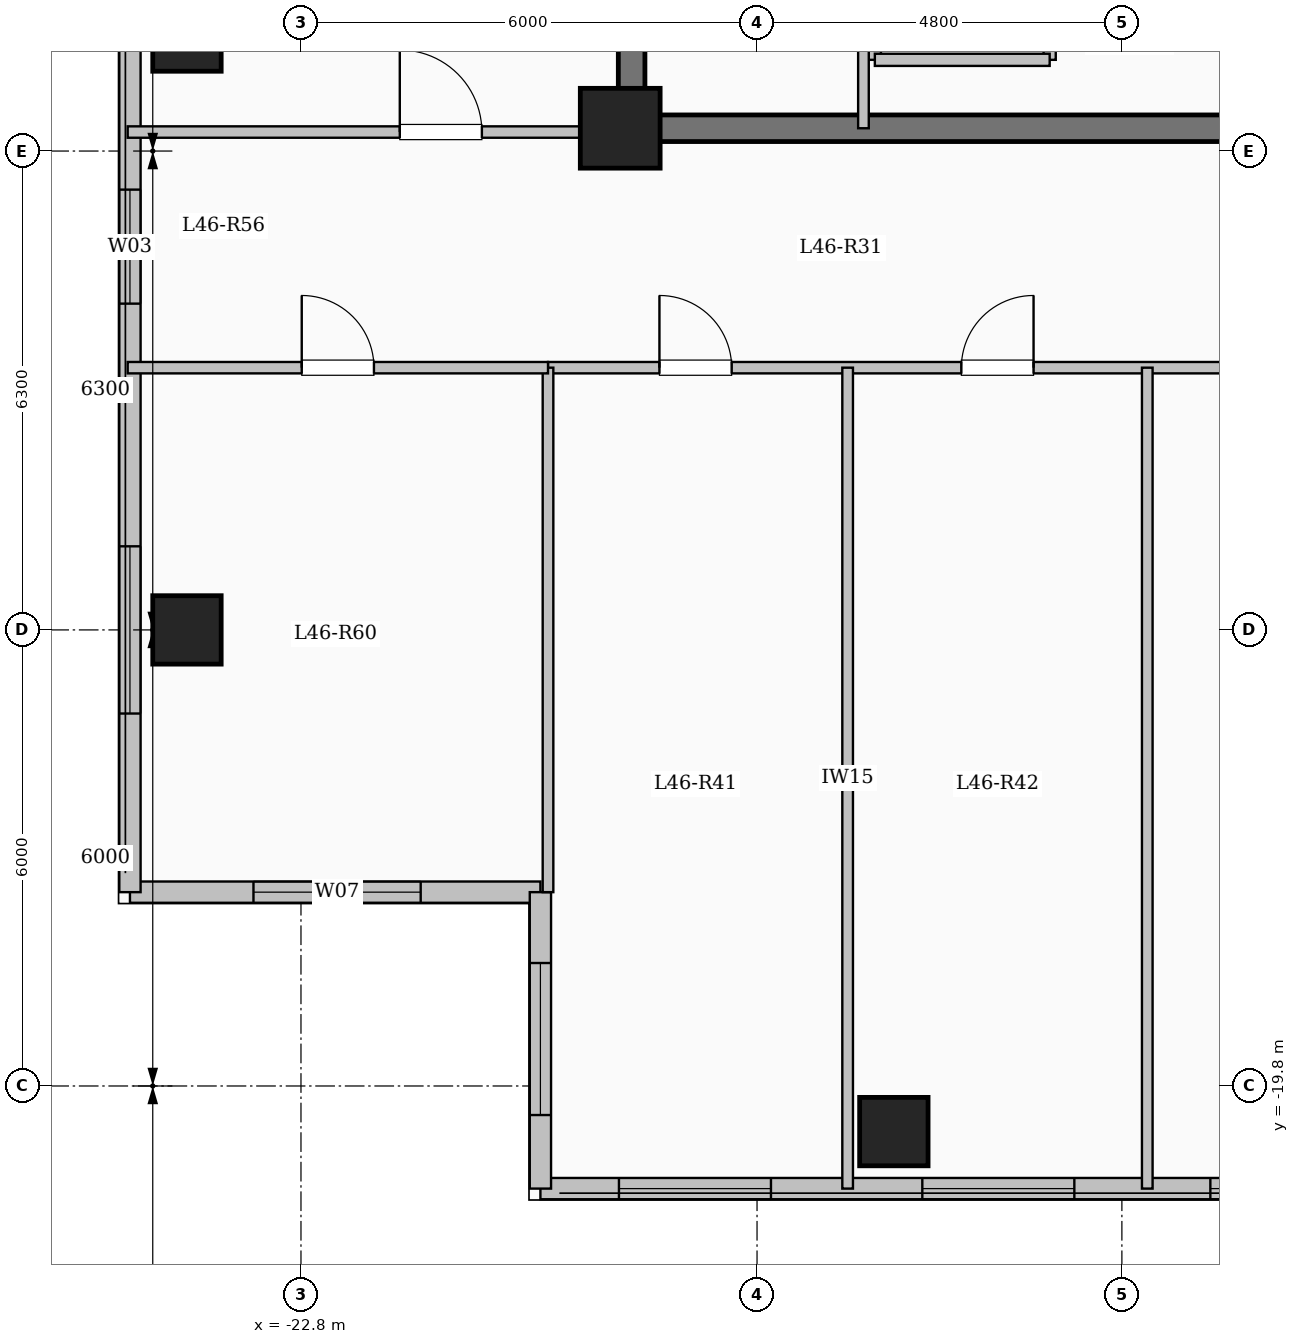
"""IFC4 building model, lengths in metres.
Left out: names, types, materials, properties, quantities, classifications, styles, units other than length and angle.
Written with IfcOpenShell. Run it as: python <this file> out.ifc"""

import sys

from ifc_helpers import new_model, si_unit, direction, frame, frame_2d, origin, origin_2d, place, context, subcontext, project, spatial, rectangle, extrude, element, fill, save


model = new_model("IFC4")
c1 = context("Model", 3, precision=1e-05, world=origin(), true_north=direction((0.0, 1.0)))
c2 = subcontext(c1, "Body", "Model", "MODEL_VIEW")
j1 = project(units=[si_unit("LENGTHUNIT", "METRE"), si_unit("PLANEANGLEUNIT", "RADIAN")], contexts=[c1])
p1 = place(None, origin())
s1 = spatial("IfcSite", under=j1, at=p1, CompositionType="ELEMENT")
p2 = place(p1, origin())
s2 = spatial("IfcBuilding", under=s1, at=p2, CompositionType="ELEMENT")
p3 = place(p2, frame((0.0, 0.0, 169.45)))
s3 = spatial("IfcBuildingStorey", under=s2, at=p3, CompositionType="ELEMENT", Elevation=169.45)
p4 = place(p3, frame((-18.6, -7.2, 0.0), z_axis=(0.0, 0.0, 1.0), x_axis=(1.0, 0.0, 0.0)))
e1 = element("IfcColumn", 1, at=p4, inside=s3, PredefinedType="COLUMN", context=c2, shape_type="SweptSolid", body=[
    extrude(rectangle(XDim=1.05, YDim=1.05, at=origin_2d()), origin(), (0.0, 0.0, 1.0), 3.35),
])
for number, where, z_axis, x_axis in (
    (2, (-15.0, -20.4, 0.0), (0.0, 0.0, 1.0), (1.0, 0.0, 0.0)),
    (3, (-24.3, -13.8, 0.0), (0.0, 0.0, 1.0), (1.0, 0.0, 0.0)),
    (4, (-24.3, -6.0, 0.0), (0.0, 0.0, 1.0), (1.0, 0.0, 0.0)),
):
    element("IfcColumn", number, at=place(p3, frame(where, z_axis=z_axis, x_axis=x_axis)), inside=s3, PredefinedType="COLUMN", context=c2, shape_type="SweptSolid", body=[
        extrude(rectangle(XDim=0.9, YDim=0.9, at=origin_2d()), origin(), (0.0, 0.0, 1.0), 3.35),
    ])
p5 = place(p3, frame((-19.65, -17.25, 0.0), z_axis=(0.0, 0.0, 1.0), x_axis=(-1.0, 0.0, 0.0)))
e5 = element("IfcWall", 5, at=p5, inside=s3, PredefinedType="SOLIDWALL", context=c2, shape_type="SweptSolid", body=[
    extrude(rectangle(XDim=5.4, YDim=0.28, at=frame_2d((2.7, 0.0))), origin(), (0.0, 0.0, 1.0), 3.05),
])
p6 = place(p5, frame((1.575, 0.0, 0.9)))
e6 = element("IfcOpeningElement", 6, at=p6, cuts=e5, PredefinedType="OPENING", context=c2, shape_type="SweptSolid", body=[
    extrude(rectangle(XDim=2.2, YDim=1.75, at=frame_2d((1.1, 0.875))), frame((0.0, 0.15, 0.0), z_axis=(0.0, -1.0, 0.0), x_axis=(1.0, 0.0, 0.0)), (0.0, 0.0, 1.0), 0.3),
])
p7 = place(p3, frame((-25.05, -17.25, 0.0), z_axis=(0.0, 0.0, 1.0), x_axis=(0.0, 1.0, 0.0)))
e7 = element("IfcWall", 7, at=p7, inside=s3, PredefinedType="SOLIDWALL", context=c2, shape_type="SweptSolid", body=[
    extrude(rectangle(XDim=34.5, YDim=0.28, at=frame_2d((17.25, 0.0))), origin(), (0.0, 0.0, 1.0), 3.05),
])
p8 = place(p7, frame((2.35, 0.0, 0.9)))
e8 = element("IfcOpeningElement", 8, at=p8, cuts=e7, PredefinedType="OPENING", context=c2, shape_type="SweptSolid", body=[
    extrude(rectangle(XDim=2.2, YDim=1.75, at=frame_2d((1.1, 0.875))), frame((0.0, 0.15, 0.0), z_axis=(0.0, -1.0, 0.0), x_axis=(1.0, 0.0, 0.0)), (0.0, 0.0, 1.0), 0.3),
])
p9 = place(p7, frame((7.742, 0.0, 0.9)))
e9 = element("IfcOpeningElement", 9, at=p9, cuts=e7, PredefinedType="OPENING", context=c2, shape_type="SweptSolid", body=[
    extrude(rectangle(XDim=1.5, YDim=1.65, at=frame_2d((0.75, 0.825))), frame((0.0, 0.15, 0.0), z_axis=(0.0, -1.0, 0.0), x_axis=(1.0, 0.0, 0.0)), (0.0, 0.0, 1.0), 0.3),
])
p10 = place(p7, frame((18.0, 0.0, 0.9)))
e10 = element("IfcOpeningElement", 10, at=p10, cuts=e7, PredefinedType="OPENING", context=c2, shape_type="SweptSolid", body=[
    extrude(rectangle(XDim=2.0, YDim=1.7, at=frame_2d((1.0, 0.85))), frame((0.0, 0.15, 0.0), z_axis=(0.0, -1.0, 0.0), x_axis=(1.0, 0.0, 0.0)), (0.0, 0.0, 1.0), 0.3),
])
p11 = place(p7, frame((28.375, 0.0, 0.95)))
e11 = element("IfcOpeningElement", 11, at=p11, cuts=e7, PredefinedType="OPENING", context=c2, shape_type="SweptSolid", body=[
    extrude(rectangle(XDim=1.0, YDim=1.5, at=frame_2d((0.5, 0.75))), frame((0.0, 0.15, 0.0), z_axis=(0.0, -1.0, 0.0), x_axis=(1.0, 0.0, 0.0)), (0.0, 0.0, 1.0), 0.3),
])
p12 = place(p7, frame((31.125, 0.0, 0.9)))
e12 = element("IfcOpeningElement", 12, at=p12, cuts=e7, PredefinedType="OPENING", context=c2, shape_type="SweptSolid", body=[
    extrude(rectangle(XDim=2.0, YDim=1.7, at=frame_2d((1.0, 0.85))), frame((0.0, 0.15, 0.0), z_axis=(0.0, -1.0, 0.0), x_axis=(1.0, 0.0, 0.0)), (0.0, 0.0, 1.0), 0.3),
])
p13 = place(p3, frame((-7.35, -21.15, 0.0), z_axis=(0.0, 0.0, 1.0), x_axis=(-1.0, 0.0, 0.0)))
e13 = element("IfcWall", 13, at=p13, inside=s3, PredefinedType="SOLIDWALL", context=c2, shape_type="SweptSolid", body=[
    extrude(rectangle(XDim=12.3, YDim=0.28, at=frame_2d((6.15, 0.0))), origin(), (0.0, 0.0, 1.0), 3.05),
])
p14 = place(p13, frame((0.147, 0.0, 0.95)))
e14 = element("IfcOpeningElement", 14, at=p14, cuts=e13, PredefinedType="OPENING", context=c2, shape_type="SweptSolid", body=[
    extrude(rectangle(XDim=0.85, YDim=1.5, at=frame_2d((0.425, 0.75))), frame((0.0, 0.15, 0.0), z_axis=(0.0, -1.0, 0.0), x_axis=(1.0, 0.0, 0.0)), (0.0, 0.0, 1.0), 0.3),
])
p15 = place(p13, frame((1.986, 0.0, 0.9)))
e15 = element("IfcOpeningElement", 15, at=p15, cuts=e13, PredefinedType="OPENING", context=c2, shape_type="SweptSolid", body=[
    extrude(rectangle(XDim=1.5, YDim=1.65, at=frame_2d((0.75, 0.825))), frame((0.0, 0.15, 0.0), z_axis=(0.0, -1.0, 0.0), x_axis=(1.0, 0.0, 0.0)), (0.0, 0.0, 1.0), 0.3),
])
p16 = place(p13, frame((5.275, 0.0, 0.9)))
e16 = element("IfcOpeningElement", 16, at=p16, cuts=e13, PredefinedType="OPENING", context=c2, shape_type="SweptSolid", body=[
    extrude(rectangle(XDim=2.0, YDim=1.7, at=frame_2d((1.0, 0.85))), frame((0.0, 0.15, 0.0), z_axis=(0.0, -1.0, 0.0), x_axis=(1.0, 0.0, 0.0)), (0.0, 0.0, 1.0), 0.3),
])
p17 = place(p13, frame((9.267, 0.0, 0.9)))
e17 = element("IfcOpeningElement", 17, at=p17, cuts=e13, PredefinedType="OPENING", context=c2, shape_type="SweptSolid", body=[
    extrude(rectangle(XDim=2.0, YDim=1.7, at=frame_2d((1.0, 0.85))), frame((0.0, 0.15, 0.0), z_axis=(0.0, -1.0, 0.0), x_axis=(1.0, 0.0, 0.0)), (0.0, 0.0, 1.0), 0.3),
])
p18 = place(p3, frame((-19.65, -21.15, 0.0), z_axis=(0.0, 0.0, 1.0), x_axis=(0.0, 1.0, 0.0)))
e18 = element("IfcWall", 18, at=p18, inside=s3, PredefinedType="SOLIDWALL", context=c2, shape_type="SweptSolid", body=[
    extrude(rectangle(XDim=3.9, YDim=0.28, at=frame_2d((1.95, 0.0))), origin(), (0.0, 0.0, 1.0), 3.05),
])
p19 = place(p18, frame((0.968, 0.0, 0.9)))
e19 = element("IfcOpeningElement", 19, at=p19, cuts=e18, PredefinedType="OPENING", context=c2, shape_type="SweptSolid", body=[
    extrude(rectangle(XDim=2.0, YDim=1.7, at=frame_2d((1.0, 0.85))), frame((0.0, 0.15, 0.0), z_axis=(0.0, -1.0, 0.0), x_axis=(1.0, 0.0, 0.0)), (0.0, 0.0, 1.0), 0.3),
])
for number, where, z_axis, x_axis in (
    (20, (-15.25, -6.3, 0.0), (0.0, 0.0, 1.0), (0.0, 1.0, 0.0)),
    (21, (-12.95, -6.3, 0.0), (0.0, 0.0, 1.0), (0.0, 1.0, 0.0)),
):
    element("IfcWall", number, at=place(p3, frame(where, z_axis=z_axis, x_axis=x_axis)), inside=s3, PredefinedType="SOLIDWALL", context=c2, shape_type="SweptSolid", body=[
        extrude(rectangle(XDim=2.6, YDim=0.16, at=frame_2d((1.3, 0.0))), origin(), (0.0, 0.0, 1.0), 3.05),
    ])
p20 = place(p3, frame((-15.25, -6.3, 0.0), z_axis=(0.0, 0.0, 1.0), x_axis=(1.0, 0.0, 0.0)))
e22 = element("IfcWall", 22, at=p20, inside=s3, PredefinedType="SOLIDWALL", context=c2, shape_type="SweptSolid", body=[
    extrude(rectangle(XDim=2.3, YDim=0.16, at=frame_2d((1.15, 0.0))), origin(), (0.0, 0.0, 1.0), 3.05),
])
p21 = place(p3, frame((-18.45, -7.375, 0.0), z_axis=(0.0, 0.0, 1.0), x_axis=(0.0, 1.0, 0.0)))
e23 = element("IfcWall", 23, at=p21, inside=s3, PredefinedType="SHEAR", context=c2, shape_type="SweptSolid", body=[
    extrude(rectangle(XDim=14.05, YDim=0.35, at=frame_2d((7.025, 0.0))), origin(), (0.0, 0.0, 1.0), 3.35),
])
p22 = place(p3, frame((-18.625, -7.2, 0.0), z_axis=(0.0, 0.0, 1.0), x_axis=(1.0, 0.0, 0.0)))
e24 = element("IfcWall", 24, at=p22, inside=s3, PredefinedType="SHEAR", context=c2, shape_type="SweptSolid", body=[
    extrude(rectangle(XDim=8.55, YDim=0.35, at=frame_2d((4.275, 0.0))), origin(), (0.0, 0.0, 1.0), 3.35),
])
p23 = place(p3, frame((-15.4, -7.2, 0.0), z_axis=(0.0, 0.0, 1.0), x_axis=(0.0, 1.0, 0.0)))
e25 = element("IfcWall", 25, at=p23, inside=s3, PredefinedType="PARTITIONING", context=c2, shape_type="SweptSolid", body=[
    extrude(rectangle(XDim=10.45, YDim=0.14, at=frame_2d((5.225, 0.0))), origin(), (0.0, 0.0, 1.0), 3.05),
])
p24 = place(p23, frame((9.25, 0.0, 0.0)))
e26 = element("IfcOpeningElement", 26, at=p24, cuts=e25, PredefinedType="OPENING", context=c2, shape_type="SweptSolid", body=[
    extrude(rectangle(XDim=0.9, YDim=2.08, at=frame_2d((0.45, 1.04))), frame((0.0, 0.08, 0.0), z_axis=(0.0, -1.0, 0.0), x_axis=(1.0, 0.0, 0.0)), (0.0, 0.0, 1.0), 0.16),
])
p25 = place(p3, frame((-19.55, -10.35, 0.0), z_axis=(0.0, 0.0, 1.0), x_axis=(1.0, 0.0, 0.0)))
e27 = element("IfcWall", 27, at=p25, inside=s3, PredefinedType="PARTITIONING", context=c2, shape_type="SweptSolid", body=[
    extrude(rectangle(XDim=11.0, YDim=0.15, at=frame_2d((5.5, 0.0))), origin(), (0.0, 0.0, 1.0), 3.05),
])
p26 = place(p25, frame((1.466, 0.0, 0.0)))
e28 = element("IfcOpeningElement", 28, at=p26, cuts=e27, PredefinedType="OPENING", context=c2, shape_type="SweptSolid", body=[
    extrude(rectangle(XDim=0.95, YDim=2.15, at=frame_2d((0.475, 1.075))), frame((0.0, 0.085, 0.0), z_axis=(0.0, -1.0, 0.0), x_axis=(1.0, 0.0, 0.0)), (0.0, 0.0, 1.0), 0.17),
])
p27 = place(p25, frame((5.438, 0.0, 0.0)))
e29 = element("IfcOpeningElement", 29, at=p27, cuts=e27, PredefinedType="OPENING", context=c2, shape_type="SweptSolid", body=[
    extrude(rectangle(XDim=0.95, YDim=2.15, at=frame_2d((0.475, 1.075))), frame((0.0, 0.085, 0.0), z_axis=(0.0, -1.0, 0.0), x_axis=(1.0, 0.0, 0.0)), (0.0, 0.0, 1.0), 0.17),
])
p28 = place(p25, frame((8.972, 0.0, 0.0)))
e30 = element("IfcOpeningElement", 30, at=p28, cuts=e27, PredefinedType="OPENING", context=c2, shape_type="SweptSolid", body=[
    extrude(rectangle(XDim=0.95, YDim=2.15, at=frame_2d((0.475, 1.075))), frame((0.0, 0.085, 0.0), z_axis=(0.0, -1.0, 0.0), x_axis=(1.0, 0.0, 0.0)), (0.0, 0.0, 1.0), 0.17),
])
for number, where, z_axis, x_axis in (
    (31, (-15.608, -21.15, 0.0), (0.0, 0.0, 1.0), (0.0, 1.0, 0.0)),
    (32, (-11.666, -21.15, 0.0), (0.0, 0.0, 1.0), (0.0, 1.0, 0.0)),
):
    element("IfcWall", number, at=place(p3, frame(where, z_axis=z_axis, x_axis=x_axis)), inside=s3, PredefinedType="PARTITIONING", context=c2, shape_type="SweptSolid", body=[
        extrude(rectangle(XDim=10.8, YDim=0.14, at=frame_2d((5.4, 0.0))), origin(), (0.0, 0.0, 1.0), 3.05),
    ])
p29 = place(p3, frame((-25.08, -7.25, 0.0), z_axis=(0.0, 0.0, 1.0), x_axis=(1.0, 0.0, 0.0)))
e33 = element("IfcWall", 33, at=p29, inside=s3, PredefinedType="PARTITIONING", context=c2, shape_type="SweptSolid", body=[
    extrude(rectangle(XDim=6.63, YDim=0.15, at=frame_2d((3.315, 0.0))), origin(), (0.0, 0.0, 1.0), 3.05),
])
p30 = place(p29, frame((3.58, 0.0, 0.0)))
e34 = element("IfcOpeningElement", 34, at=p30, cuts=e33, PredefinedType="OPENING", context=c2, shape_type="SweptSolid", body=[
    extrude(rectangle(XDim=1.08, YDim=2.15, at=frame_2d((0.54, 1.075))), frame((0.0, 0.085, 0.0), z_axis=(0.0, -1.0, 0.0), x_axis=(1.0, 0.0, 0.0)), (0.0, 0.0, 1.0), 0.17),
])
p31 = place(p3, frame((-19.55, -17.25, 0.0), z_axis=(0.0, 0.0, 1.0), x_axis=(0.0, 1.0, 0.0)))
e35 = element("IfcWall", 35, at=p31, inside=s3, PredefinedType="PARTITIONING", context=c2, shape_type="SweptSolid", body=[
    extrude(rectangle(XDim=6.9, YDim=0.14, at=frame_2d((3.45, 0.0))), origin(), (0.0, 0.0, 1.0), 3.05),
])
p32 = place(p3, frame((-25.08, -10.35, 0.0), z_axis=(0.0, 0.0, 1.0), x_axis=(1.0, 0.0, 0.0)))
e36 = element("IfcWall", 36, at=p32, inside=s3, PredefinedType="PARTITIONING", context=c2, shape_type="SweptSolid", body=[
    extrude(rectangle(XDim=5.53, YDim=0.15, at=frame_2d((2.765, 0.0))), origin(), (0.0, 0.0, 1.0), 3.05),
])
p33 = place(p32, frame((2.29, 0.0, 0.0)))
e37 = element("IfcOpeningElement", 37, at=p33, cuts=e36, PredefinedType="OPENING", context=c2, shape_type="SweptSolid", body=[
    extrude(rectangle(XDim=0.95, YDim=2.15, at=frame_2d((0.475, 1.075))), frame((0.0, 0.085, 0.0), z_axis=(0.0, -1.0, 0.0), x_axis=(1.0, 0.0, 0.0)), (0.0, 0.0, 1.0), 0.17),
])
p34 = place(p6, origin())
e38 = element("IfcWindow", 38, at=p34, inside=s3, PartitioningType="SINGLE_PANEL", PredefinedType="WINDOW", context=c2, shape_type="SweptSolid", body=[
    extrude(rectangle(XDim=2.2, YDim=1.75, at=frame_2d((1.1, 0.875))), frame((0.0, 0.03, 0.0), z_axis=(0.0, -1.0, 0.0), x_axis=(1.0, 0.0, 0.0)), (0.0, 0.0, 1.0), 0.06),
])
fill(e6, e38)
p35 = place(p8, origin())
e39 = element("IfcWindow", 39, at=p35, inside=s3, PartitioningType="SINGLE_PANEL", PredefinedType="WINDOW", context=c2, shape_type="SweptSolid", body=[
    extrude(rectangle(XDim=2.2, YDim=1.75, at=frame_2d((1.1, 0.875))), frame((0.0, 0.03, 0.0), z_axis=(0.0, -1.0, 0.0), x_axis=(1.0, 0.0, 0.0)), (0.0, 0.0, 1.0), 0.06),
])
fill(e8, e39)
p36 = place(p9, origin())
e40 = element("IfcWindow", 40, at=p36, inside=s3, PartitioningType="SINGLE_PANEL", PredefinedType="WINDOW", context=c2, shape_type="SweptSolid", body=[
    extrude(rectangle(XDim=1.5, YDim=1.65, at=frame_2d((0.75, 0.825))), frame((0.0, 0.03, 0.0), z_axis=(0.0, -1.0, 0.0), x_axis=(1.0, 0.0, 0.0)), (0.0, 0.0, 1.0), 0.06),
])
fill(e9, e40)
p37 = place(p15, origin())
e41 = element("IfcWindow", 41, at=p37, inside=s3, PartitioningType="SINGLE_PANEL", PredefinedType="WINDOW", context=c2, shape_type="SweptSolid", body=[
    extrude(rectangle(XDim=1.5, YDim=1.65, at=frame_2d((0.75, 0.825))), frame((0.0, 0.03, 0.0), z_axis=(0.0, -1.0, 0.0), x_axis=(1.0, 0.0, 0.0)), (0.0, 0.0, 1.0), 0.06),
])
fill(e15, e41)
p38 = place(p16, origin())
e42 = element("IfcWindow", 42, at=p38, inside=s3, PartitioningType="SINGLE_PANEL", PredefinedType="WINDOW", context=c2, shape_type="SweptSolid", body=[
    extrude(rectangle(XDim=2.0, YDim=1.7, at=frame_2d((1.0, 0.85))), frame((0.0, 0.03, 0.0), z_axis=(0.0, -1.0, 0.0), x_axis=(1.0, 0.0, 0.0)), (0.0, 0.0, 1.0), 0.06),
])
fill(e16, e42)
p39 = place(p17, origin())
e43 = element("IfcWindow", 43, at=p39, inside=s3, PartitioningType="SINGLE_PANEL", PredefinedType="WINDOW", context=c2, shape_type="SweptSolid", body=[
    extrude(rectangle(XDim=2.0, YDim=1.7, at=frame_2d((1.0, 0.85))), frame((0.0, 0.03, 0.0), z_axis=(0.0, -1.0, 0.0), x_axis=(1.0, 0.0, 0.0)), (0.0, 0.0, 1.0), 0.06),
])
fill(e17, e43)
p40 = place(p19, origin())
e44 = element("IfcWindow", 44, at=p40, inside=s3, PartitioningType="SINGLE_PANEL", PredefinedType="WINDOW", context=c2, shape_type="SweptSolid", body=[
    extrude(rectangle(XDim=2.0, YDim=1.7, at=frame_2d((1.0, 0.85))), frame((0.0, 0.03, 0.0), z_axis=(0.0, -1.0, 0.0), x_axis=(1.0, 0.0, 0.0)), (0.0, 0.0, 1.0), 0.06),
])
fill(e19, e44)
p41 = place(p26, origin())
e45 = element("IfcDoor", 45, at=p41, inside=s3, OperationType="SINGLE_SWING_LEFT", PredefinedType="DOOR", context=c2, shape_type="SweptSolid", body=[
    extrude(rectangle(XDim=0.95, YDim=2.15, at=frame_2d((0.475, 1.075))), frame((0.0, 0.025, 0.0), z_axis=(0.0, -1.0, 0.0), x_axis=(1.0, 0.0, 0.0)), (0.0, 0.0, 1.0), 0.05),
])
fill(e28, e45)
p42 = place(p27, origin())
e46 = element("IfcDoor", 46, at=p42, inside=s3, OperationType="SINGLE_SWING_RIGHT", PredefinedType="DOOR", context=c2, shape_type="SweptSolid", body=[
    extrude(rectangle(XDim=0.95, YDim=2.15, at=frame_2d((0.475, 1.075))), frame((0.0, 0.025, 0.0), z_axis=(0.0, -1.0, 0.0), x_axis=(1.0, 0.0, 0.0)), (0.0, 0.0, 1.0), 0.05),
])
fill(e29, e46)
p43 = place(p33, origin())
e47 = element("IfcDoor", 47, at=p43, inside=s3, OperationType="SINGLE_SWING_LEFT", PredefinedType="DOOR", context=c2, shape_type="SweptSolid", body=[
    extrude(rectangle(XDim=0.95, YDim=2.15, at=frame_2d((0.475, 1.075))), frame((0.0, 0.025, 0.0), z_axis=(0.0, -1.0, 0.0), x_axis=(1.0, 0.0, 0.0)), (0.0, 0.0, 1.0), 0.05),
])
fill(e37, e47)
p44 = place(p30, origin())
e48 = element("IfcDoor", 48, at=p44, inside=s3, OperationType="SINGLE_SWING_LEFT", PredefinedType="DOOR", context=c2, shape_type="SweptSolid", body=[
    extrude(rectangle(XDim=1.08, YDim=2.15, at=frame_2d((0.54, 1.075))), frame((0.0, 0.025, 0.0), z_axis=(0.0, -1.0, 0.0), x_axis=(1.0, 0.0, 0.0)), (0.0, 0.0, 1.0), 0.05),
])
fill(e34, e48)
save(model, sys.argv[1])
